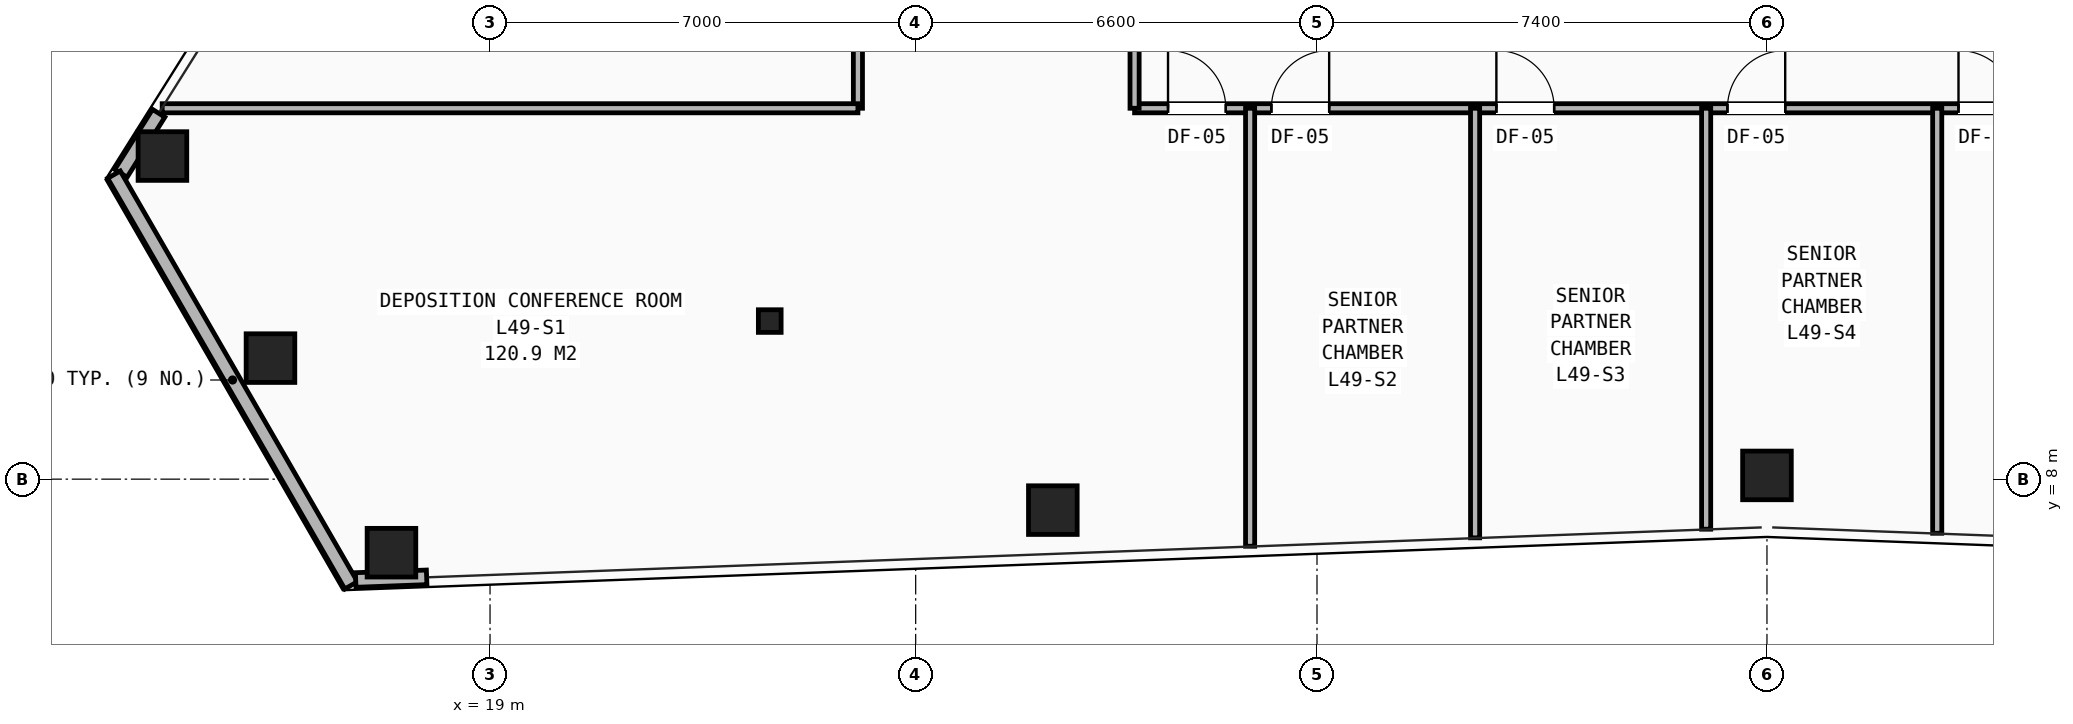
"""IFC4 building model, lengths in metres.
Left out: names, types, materials, properties, quantities, classifications, styles, units other than length and angle.
Written with IfcOpenShell. Run it as: python <this file> out.ifc"""

import sys

from ifc_helpers import new_model, si_unit, direction, frame, frame_2d, origin, origin_2d, place, context, subcontext, project, spatial, rectangle, hollow_rectangle, i_section, extrude, element, fill, save


model = new_model("IFC4")
c1 = context("Model", 3, precision=1e-05, world=origin(), true_north=direction((0.0, 1.0)))
c2 = subcontext(c1, "Body", "Model", "MODEL_VIEW")
j1 = project(units=[si_unit("LENGTHUNIT", "METRE"), si_unit("PLANEANGLEUNIT", "RADIAN")], contexts=[c1])
p1 = place(None, origin())
s1 = spatial("IfcSite", under=j1, at=p1, CompositionType="ELEMENT")
p2 = place(p1, origin())
s2 = spatial("IfcBuilding", under=s1, at=p2, CompositionType="ELEMENT")
p3 = place(p2, frame((0.0, 0.0, 172.35)))
s3 = spatial("IfcBuildingStorey", under=s2, at=p3, CompositionType="ELEMENT", Elevation=172.35)
p4 = place(p3, frame((23.6, 10.6, 0.0), z_axis=(0.0, 0.0, 1.0), x_axis=(1.0, 0.0, 0.0)))
e1 = element("IfcColumn", 1, at=p4, inside=s3, PredefinedType="COLUMN", context=c2, shape_type="SweptSolid", body=[
    extrude(i_section(OverallWidth=0.374, OverallDepth=0.372, WebThickness=0.016, FlangeThickness=0.026, at=origin_2d()), origin(), (0.0, 0.0, 1.0), 3.45),
])
for number, where, z_axis, x_axis in (
    (2, (13.612, 13.314, 0.0), (0.0, 0.0, 1.0), (1.0, 0.0, 0.0)),
    (3, (15.389, 9.991, 0.0), (0.0, 0.0, 1.0), (1.0, 0.0, 0.0)),
    (4, (17.379, 6.791, 0.0), (0.0, 0.0, 1.0), (1.0, 0.0, 0.0)),
    (5, (28.256, 7.491, 0.0), (0.0, 0.0, 1.0), (1.0, 0.0, 0.0)),
    (6, (40.0, 8.061, 0.0), (0.0, 0.0, 1.0), (1.0, 0.0, 0.0)),
):
    element("IfcColumn", number, at=place(p3, frame(where, z_axis=z_axis, x_axis=x_axis)), inside=s3, PredefinedType="COLUMN", context=c2, shape_type="SweptSolid", body=[
        extrude(hollow_rectangle(XDim=0.8, YDim=0.8, WallThickness=0.055, at=origin_2d()), origin(), (0.0, 0.0, 1.0), 3.45),
    ])
p5 = place(p3, frame((13.551, 14.018, 0.0), z_axis=(0.0, 0.0, 1.0), x_axis=(-0.532008789028, -0.84673883128, 0.0)))
e7 = element("IfcWall", 7, at=p5, inside=s3, PredefinedType="SHEAR", context=c2, shape_type="SweptSolid", body=[
    extrude(rectangle(XDim=1.167, YDim=0.24, at=frame_2d((0.584, 0.0))), origin(), (0.0, 0.0, 1.0), 2.583),
])
p6 = place(p3, frame((16.716, 6.253, 0.0), z_axis=(0.0, 0.0, 1.0), x_axis=(-0.500020487837, 0.866013574803, 0.0)))
e8 = element("IfcWall", 8, at=p6, inside=s3, PredefinedType="SHEAR", context=c2, shape_type="SweptSolid", body=[
    extrude(rectangle(XDim=7.8, YDim=0.24, at=frame_2d((3.9, 0.0))), origin(), (0.0, 0.0, 1.0), 2.583),
])
p7 = place(p3, frame((16.791, 6.341, 0.0), z_axis=(0.0, 0.0, 1.0), x_axis=(0.999299278667, 0.037429288739, 0.0)))
e9 = element("IfcWall", 9, at=p7, inside=s3, PredefinedType="SHEAR", context=c2, shape_type="SweptSolid", body=[
    extrude(rectangle(XDim=1.167, YDim=0.24, at=frame_2d((0.584, 0.0))), origin(), (0.0, 0.0, 1.0), 2.583),
])
p8 = place(p3, frame((29.6, 14.1, 0.0), z_axis=(0.0, 0.0, 1.0), x_axis=(1.0, 0.0, 0.0)))
e10 = element("IfcWall", 10, at=p8, inside=s3, PredefinedType="PARTITIONING", context=c2, shape_type="SweptSolid", body=[
    extrude(rectangle(XDim=18.6, YDim=0.15, at=frame_2d((9.3, 0.0))), origin(), (0.0, 0.0, 1.0), 2.252),
])
p9 = place(p8, frame((0.55, 0.0, 0.0)))
e11 = element("IfcOpeningElement", 11, at=p9, cuts=e10, PredefinedType="OPENING", context=c2, shape_type="SweptSolid", body=[
    extrude(rectangle(XDim=0.95, YDim=2.1, at=frame_2d((0.475, 1.05))), frame((0.0, 0.085, 0.0), z_axis=(0.0, -1.0, 0.0), x_axis=(1.0, 0.0, 0.0)), (0.0, 0.0, 1.0), 0.17),
])
p10 = place(p8, frame((2.25, 0.0, 0.0)))
e12 = element("IfcOpeningElement", 12, at=p10, cuts=e10, PredefinedType="OPENING", context=c2, shape_type="SweptSolid", body=[
    extrude(rectangle(XDim=0.95, YDim=2.1, at=frame_2d((0.475, 1.05))), frame((0.0, 0.085, 0.0), z_axis=(0.0, -1.0, 0.0), x_axis=(1.0, 0.0, 0.0)), (0.0, 0.0, 1.0), 0.17),
])
p11 = place(p8, frame((5.95, 0.0, 0.0)))
e13 = element("IfcOpeningElement", 13, at=p11, cuts=e10, PredefinedType="OPENING", context=c2, shape_type="SweptSolid", body=[
    extrude(rectangle(XDim=0.95, YDim=2.1, at=frame_2d((0.475, 1.05))), frame((0.0, 0.085, 0.0), z_axis=(0.0, -1.0, 0.0), x_axis=(1.0, 0.0, 0.0)), (0.0, 0.0, 1.0), 0.17),
])
p12 = place(p8, frame((9.75, 0.0, 0.0)))
e14 = element("IfcOpeningElement", 14, at=p12, cuts=e10, PredefinedType="OPENING", context=c2, shape_type="SweptSolid", body=[
    extrude(rectangle(XDim=0.95, YDim=2.1, at=frame_2d((0.475, 1.05))), frame((0.0, 0.085, 0.0), z_axis=(0.0, -1.0, 0.0), x_axis=(1.0, 0.0, 0.0)), (0.0, 0.0, 1.0), 0.17),
])
p13 = place(p8, frame((13.55, 0.0, 0.0)))
e15 = element("IfcOpeningElement", 15, at=p13, cuts=e10, PredefinedType="OPENING", context=c2, shape_type="SweptSolid", body=[
    extrude(rectangle(XDim=0.95, YDim=2.1, at=frame_2d((0.475, 1.05))), frame((0.0, 0.085, 0.0), z_axis=(0.0, -1.0, 0.0), x_axis=(1.0, 0.0, 0.0)), (0.0, 0.0, 1.0), 0.17),
])
p14 = place(p8, frame((16.95, 0.0, 0.0)))
e16 = element("IfcOpeningElement", 16, at=p14, cuts=e10, PredefinedType="OPENING", context=c2, shape_type="SweptSolid", body=[
    extrude(rectangle(XDim=0.95, YDim=2.1, at=frame_2d((0.475, 1.05))), frame((0.0, 0.085, 0.0), z_axis=(0.0, -1.0, 0.0), x_axis=(1.0, 0.0, 0.0)), (0.0, 0.0, 1.0), 0.17),
])
p15 = place(p3, frame((29.6, 14.1, 0.0), z_axis=(0.0, 0.0, 1.0), x_axis=(0.0, 1.0, 0.0)))
e17 = element("IfcWall", 17, at=p15, inside=s3, PredefinedType="PARTITIONING", context=c2, shape_type="SweptSolid", body=[
    extrude(rectangle(XDim=8.7, YDim=0.15, at=frame_2d((4.35, 0.0))), origin(), (0.0, 0.0, 1.0), 3.21),
])
p16 = place(p15, frame((2.65, 0.0, 0.0)))
e18 = element("IfcOpeningElement", 18, at=p16, cuts=e17, PredefinedType="OPENING", context=c2, shape_type="SweptSolid", body=[
    extrude(rectangle(XDim=0.85, YDim=2.05, at=frame_2d((0.425, 1.025))), frame((0.0, 0.085, 0.0), z_axis=(0.0, -1.0, 0.0), x_axis=(1.0, 0.0, 0.0)), (0.0, 0.0, 1.0), 0.17),
])
p17 = place(p15, frame((4.75, 0.0, 0.0)))
e19 = element("IfcOpeningElement", 19, at=p17, cuts=e17, PredefinedType="OPENING", context=c2, shape_type="SweptSolid", body=[
    extrude(rectangle(XDim=0.85, YDim=2.05, at=frame_2d((0.425, 1.025))), frame((0.0, 0.085, 0.0), z_axis=(0.0, -1.0, 0.0), x_axis=(1.0, 0.0, 0.0)), (0.0, 0.0, 1.0), 0.17),
])
p18 = place(p15, frame((6.85, 0.0, 0.0)))
e20 = element("IfcOpeningElement", 20, at=p18, cuts=e17, PredefinedType="OPENING", context=c2, shape_type="SweptSolid", body=[
    extrude(rectangle(XDim=0.85, YDim=2.05, at=frame_2d((0.425, 1.025))), frame((0.0, 0.085, 0.0), z_axis=(0.0, -1.0, 0.0), x_axis=(1.0, 0.0, 0.0)), (0.0, 0.0, 1.0), 0.17),
])
p19 = place(p3, frame((25.05, 14.1, 0.0), z_axis=(0.0, 0.0, 1.0), x_axis=(0.0, 1.0, 0.0)))
e21 = element("IfcWall", 21, at=p19, inside=s3, PredefinedType="PARTITIONING", context=c2, shape_type="SweptSolid", body=[
    extrude(rectangle(XDim=8.7, YDim=0.15, at=frame_2d((4.35, 0.0))), origin(), (0.0, 0.0, 1.0), 3.21),
])
p20 = place(p3, frame((31.5, 6.896, 0.0), z_axis=(0.0, 0.0, 1.0), x_axis=(0.0, 1.0, 0.0)))
e22 = element("IfcWall", 22, at=p20, inside=s3, PredefinedType="PARTITIONING", context=c2, shape_type="SweptSolid", body=[
    extrude(rectangle(XDim=7.204, YDim=0.15, at=frame_2d((3.602, 0.0))), origin(), (0.0, 0.0, 1.0), 2.589),
])
p21 = place(p3, frame((35.2, 7.035, 0.0), z_axis=(0.0, 0.0, 1.0), x_axis=(0.0, 1.0, 0.0)))
e23 = element("IfcWall", 23, at=p21, inside=s3, PredefinedType="PARTITIONING", context=c2, shape_type="SweptSolid", body=[
    extrude(rectangle(XDim=7.065, YDim=0.15, at=frame_2d((3.533, 0.0))), origin(), (0.0, 0.0, 1.0), 2.252),
])
p22 = place(p3, frame((39.0, 7.177, 0.0), z_axis=(0.0, 0.0, 1.0), x_axis=(0.0, 1.0, 0.0)))
e24 = element("IfcWall", 24, at=p22, inside=s3, PredefinedType="PARTITIONING", context=c2, shape_type="SweptSolid", body=[
    extrude(rectangle(XDim=6.923, YDim=0.15, at=frame_2d((3.461, 0.0))), origin(), (0.0, 0.0, 1.0), 2.252),
])
p23 = place(p3, frame((42.8, 7.11, 0.0), z_axis=(0.0, 0.0, 1.0), x_axis=(0.0, 1.0, 0.0)))
e25 = element("IfcWall", 25, at=p23, inside=s3, PredefinedType="PARTITIONING", context=c2, shape_type="SweptSolid", body=[
    extrude(rectangle(XDim=6.99, YDim=0.15, at=frame_2d((3.495, 0.0))), origin(), (0.0, 0.0, 1.0), 2.589),
])
p24 = place(p3, frame((13.608, 14.1, 0.0), z_axis=(0.0, 0.0, 1.0), x_axis=(1.0, 0.0, 0.0)))
e26 = element("IfcWall", 26, at=p24, inside=s3, PredefinedType="PARTITIONING", context=c2, shape_type="SweptSolid", body=[
    extrude(rectangle(XDim=11.442, YDim=0.15, at=frame_2d((5.721, 0.0))), origin(), (0.0, 0.0, 1.0), 2.589),
])
p25 = place(p9, origin())
e27 = element("IfcDoor", 27, at=p25, inside=s3, OperationType="SINGLE_SWING_LEFT", PredefinedType="DOOR", context=c2, shape_type="SweptSolid", body=[
    extrude(rectangle(XDim=0.95, YDim=2.1, at=frame_2d((0.475, 1.05))), frame((0.0, 0.025, 0.0), z_axis=(0.0, -1.0, 0.0), x_axis=(1.0, 0.0, 0.0)), (0.0, 0.0, 1.0), 0.05),
])
fill(e11, e27)
p26 = place(p10, origin())
e28 = element("IfcDoor", 28, at=p26, inside=s3, OperationType="SINGLE_SWING_RIGHT", PredefinedType="DOOR", context=c2, shape_type="SweptSolid", body=[
    extrude(rectangle(XDim=0.95, YDim=2.1, at=frame_2d((0.475, 1.05))), frame((0.0, 0.025, 0.0), z_axis=(0.0, -1.0, 0.0), x_axis=(1.0, 0.0, 0.0)), (0.0, 0.0, 1.0), 0.05),
])
fill(e12, e28)
p27 = place(p11, origin())
e29 = element("IfcDoor", 29, at=p27, inside=s3, OperationType="SINGLE_SWING_LEFT", PredefinedType="DOOR", context=c2, shape_type="SweptSolid", body=[
    extrude(rectangle(XDim=0.95, YDim=2.1, at=frame_2d((0.475, 1.05))), frame((0.0, 0.025, 0.0), z_axis=(0.0, -1.0, 0.0), x_axis=(1.0, 0.0, 0.0)), (0.0, 0.0, 1.0), 0.05),
])
fill(e13, e29)
p28 = place(p12, origin())
e30 = element("IfcDoor", 30, at=p28, inside=s3, OperationType="SINGLE_SWING_RIGHT", PredefinedType="DOOR", context=c2, shape_type="SweptSolid", body=[
    extrude(rectangle(XDim=0.95, YDim=2.1, at=frame_2d((0.475, 1.05))), frame((0.0, 0.025, 0.0), z_axis=(0.0, -1.0, 0.0), x_axis=(1.0, 0.0, 0.0)), (0.0, 0.0, 1.0), 0.05),
])
fill(e14, e30)
p29 = place(p13, origin())
e31 = element("IfcDoor", 31, at=p29, inside=s3, OperationType="SINGLE_SWING_LEFT", PredefinedType="DOOR", context=c2, shape_type="SweptSolid", body=[
    extrude(rectangle(XDim=0.95, YDim=2.1, at=frame_2d((0.475, 1.05))), frame((0.0, 0.025, 0.0), z_axis=(0.0, -1.0, 0.0), x_axis=(1.0, 0.0, 0.0)), (0.0, 0.0, 1.0), 0.05),
])
fill(e15, e31)
save(model, sys.argv[1])
